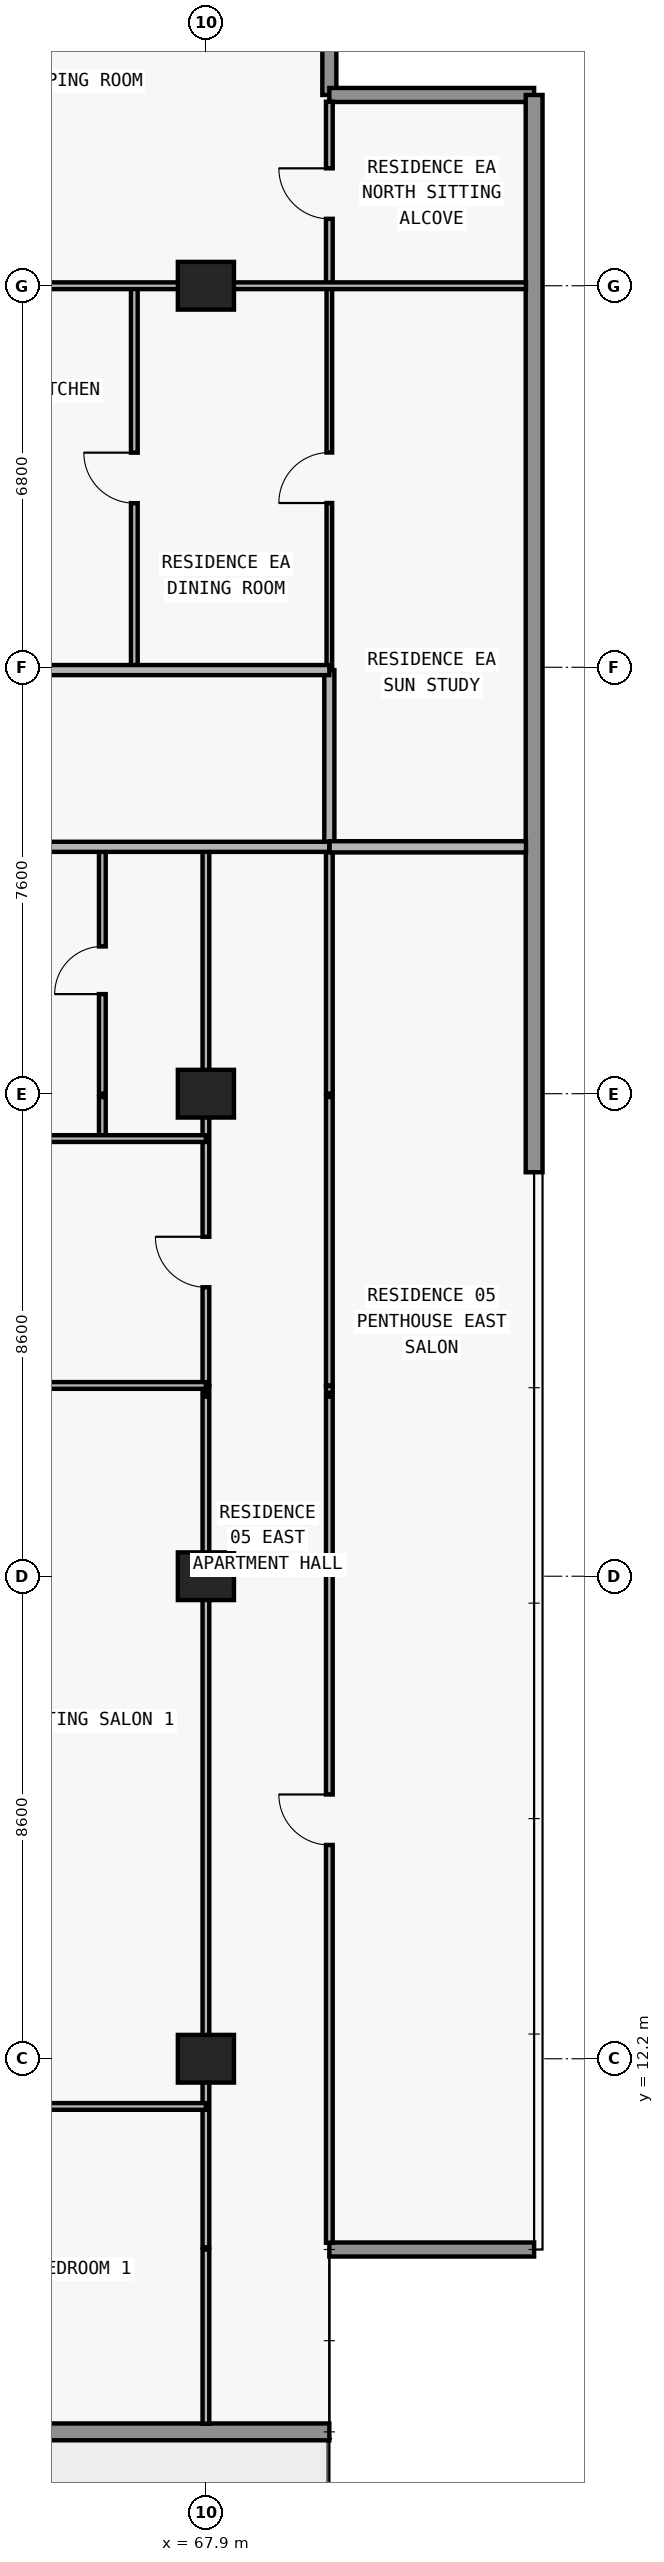
"""IFC4 building model, lengths in metres.
Left out: names, types, materials, properties, quantities, classifications, styles, units other than length and angle.
Written with IfcOpenShell. Run it as: python <this file> out.ifc"""

import sys

from ifc_helpers import new_model, si_unit, direction, frame, frame_2d, origin, origin_2d, place, context, subcontext, project, spatial, rectangle, extrude, element, fill, save


model = new_model("IFC4")
c1 = context("Model", 3, precision=1e-05, world=origin(), true_north=direction((0.0, 1.0)))
c2 = subcontext(c1, "Body", "Model", "MODEL_VIEW")
j1 = project(units=[si_unit("LENGTHUNIT", "METRE"), si_unit("PLANEANGLEUNIT", "RADIAN")], contexts=[c1])
p1 = place(None, origin())
s1 = spatial("IfcSite", under=j1, at=p1, CompositionType="ELEMENT")
p2 = place(p1, origin())
s2 = spatial("IfcBuilding", under=s1, at=p2, CompositionType="ELEMENT")
p3 = place(p2, frame((0.0, 0.0, 91.2)))
s3 = spatial("IfcBuildingStorey", under=s2, at=p3, CompositionType="ELEMENT", Elevation=91.2)
for number, where, z_axis, x_axis in (
    (1, (67.9, 12.2, 0.0), (0.0, 0.0, 1.0), (1.0, 0.0, 0.0)),
    (2, (67.9, 20.8, 0.0), (0.0, 0.0, 1.0), (1.0, 0.0, 0.0)),
    (3, (67.9, 29.4, 0.0), (0.0, 0.0, 1.0), (1.0, 0.0, 0.0)),
    (4, (67.9, 43.8, 0.0), (0.0, 0.0, 1.0), (1.0, 0.0, 0.0)),
):
    element("IfcColumn", number, at=place(p3, frame(where, z_axis=z_axis, x_axis=x_axis)), inside=s3, PredefinedType="COLUMN", context=c2, shape_type="SweptSolid", body=[
        extrude(rectangle(XDim=1.0, YDim=0.85, at=origin_2d()), origin(), (0.0, 0.0, 1.0), 3.05),
    ])
p4 = place(p3, frame((70.1, 5.55, 0.0), z_axis=(0.0, 0.0, 1.0), x_axis=(-1.0, 0.0, 0.0)))
e5 = element("IfcWall", 5, at=p4, inside=s3, PredefinedType="STANDARD", context=c2, shape_type="SweptSolid", body=[
    extrude(rectangle(XDim=62.4, YDim=0.3, at=frame_2d((31.2, 0.0))), origin(), (0.0, 0.0, 1.0), 3.05),
])
p5 = place(p4, frame((57.29, 0.0, 0.0)))
e6 = element("IfcOpeningElement", 6, at=p5, cuts=e5, PredefinedType="OPENING", context=c2, shape_type="SweptSolid", body=[
    extrude(rectangle(XDim=2.0, YDim=2.3, at=frame_2d((1.0, 1.15))), frame((0.0, 0.16, 0.0), z_axis=(0.0, -1.0, 0.0), x_axis=(1.0, 0.0, 0.0)), (0.0, 0.0, 1.0), 0.32),
])
p6 = place(p4, frame((52.61, 0.0, 0.65)))
e7 = element("IfcOpeningElement", 7, at=p6, cuts=e5, PredefinedType="OPENING", context=c2, shape_type="SweptSolid", body=[
    extrude(rectangle(XDim=2.6, YDim=1.85, at=frame_2d((1.3, 0.925))), frame((0.0, 0.16, 0.0), z_axis=(0.0, -1.0, 0.0), x_axis=(1.0, 0.0, 0.0)), (0.0, 0.0, 1.0), 0.32),
])
p7 = place(p4, frame((46.5, 0.0, 0.85)))
e8 = element("IfcOpeningElement", 8, at=p7, cuts=e5, PredefinedType="OPENING", context=c2, shape_type="SweptSolid", body=[
    extrude(rectangle(XDim=2.2, YDim=1.55, at=frame_2d((1.1, 0.775))), frame((0.0, 0.16, 0.0), z_axis=(0.0, -1.0, 0.0), x_axis=(1.0, 0.0, 0.0)), (0.0, 0.0, 1.0), 0.32),
])
p8 = place(p4, frame((40.09, 0.0, 0.0)))
e9 = element("IfcOpeningElement", 9, at=p8, cuts=e5, PredefinedType="OPENING", context=c2, shape_type="SweptSolid", body=[
    extrude(rectangle(XDim=2.0, YDim=2.3, at=frame_2d((1.0, 1.15))), frame((0.0, 0.16, 0.0), z_axis=(0.0, -1.0, 0.0), x_axis=(1.0, 0.0, 0.0)), (0.0, 0.0, 1.0), 0.32),
])
p9 = place(p4, frame((35.99, 0.0, 0.85)))
e10 = element("IfcOpeningElement", 10, at=p9, cuts=e5, PredefinedType="OPENING", context=c2, shape_type="SweptSolid", body=[
    extrude(rectangle(XDim=1.8, YDim=1.55, at=frame_2d((0.9, 0.775))), frame((0.0, 0.16, 0.0), z_axis=(0.0, -1.0, 0.0), x_axis=(1.0, 0.0, 0.0)), (0.0, 0.0, 1.0), 0.32),
])
p10 = place(p4, frame((28.314, 0.0, 0.85)))
e11 = element("IfcOpeningElement", 11, at=p10, cuts=e5, PredefinedType="OPENING", context=c2, shape_type="SweptSolid", body=[
    extrude(rectangle(XDim=2.2, YDim=1.55, at=frame_2d((1.1, 0.775))), frame((0.0, 0.16, 0.0), z_axis=(0.0, -1.0, 0.0), x_axis=(1.0, 0.0, 0.0)), (0.0, 0.0, 1.0), 0.32),
])
p11 = place(p4, frame((24.09, 0.0, 0.0)))
e12 = element("IfcOpeningElement", 12, at=p11, cuts=e5, PredefinedType="OPENING", context=c2, shape_type="SweptSolid", body=[
    extrude(rectangle(XDim=2.0, YDim=2.3, at=frame_2d((1.0, 1.15))), frame((0.0, 0.16, 0.0), z_axis=(0.0, -1.0, 0.0), x_axis=(1.0, 0.0, 0.0)), (0.0, 0.0, 1.0), 0.32),
])
p12 = place(p4, frame((19.99, 0.0, 0.85)))
e13 = element("IfcOpeningElement", 13, at=p12, cuts=e5, PredefinedType="OPENING", context=c2, shape_type="SweptSolid", body=[
    extrude(rectangle(XDim=1.8, YDim=1.55, at=frame_2d((0.9, 0.775))), frame((0.0, 0.16, 0.0), z_axis=(0.0, -1.0, 0.0), x_axis=(1.0, 0.0, 0.0)), (0.0, 0.0, 1.0), 0.32),
])
p13 = place(p4, frame((16.09, 0.0, 0.0)))
e14 = element("IfcOpeningElement", 14, at=p13, cuts=e5, PredefinedType="OPENING", context=c2, shape_type="SweptSolid", body=[
    extrude(rectangle(XDim=2.0, YDim=2.3, at=frame_2d((1.0, 1.15))), frame((0.0, 0.16, 0.0), z_axis=(0.0, -1.0, 0.0), x_axis=(1.0, 0.0, 0.0)), (0.0, 0.0, 1.0), 0.32),
])
p14 = place(p4, frame((11.41, 0.0, 0.65)))
e15 = element("IfcOpeningElement", 15, at=p14, cuts=e5, PredefinedType="OPENING", context=c2, shape_type="SweptSolid", body=[
    extrude(rectangle(XDim=2.6, YDim=1.85, at=frame_2d((1.3, 0.925))), frame((0.0, 0.16, 0.0), z_axis=(0.0, -1.0, 0.0), x_axis=(1.0, 0.0, 0.0)), (0.0, 0.0, 1.0), 0.32),
])
p15 = place(p4, frame((5.3, 0.0, 0.85)))
e16 = element("IfcOpeningElement", 16, at=p15, cuts=e5, PredefinedType="OPENING", context=c2, shape_type="SweptSolid", body=[
    extrude(rectangle(XDim=2.2, YDim=1.55, at=frame_2d((1.1, 0.775))), frame((0.0, 0.16, 0.0), z_axis=(0.0, -1.0, 0.0), x_axis=(1.0, 0.0, 0.0)), (0.0, 0.0, 1.0), 0.32),
])
p16 = place(p3, frame((70.1, 8.8, 0.0), z_axis=(0.0, 0.0, 1.0), x_axis=(1.0, 0.0, 0.0)))
e17 = element("IfcWall", 17, at=p16, inside=s3, PredefinedType="ELEMENTEDWALL", context=c2, shape_type="SweptSolid", body=[
    extrude(rectangle(XDim=3.65, YDim=0.25, at=frame_2d((1.825, 0.0))), origin(), (0.0, 0.0, 1.0), 3.05),
])
p17 = place(p3, frame((70.1, 50.45, 0.0), z_axis=(0.0, 0.0, 1.0), x_axis=(0.0, -1.0, 0.0)))
e18 = element("IfcWall", 18, at=p17, inside=s3, PredefinedType="ELEMENTEDWALL", context=c2, shape_type="SweptSolid", body=[
    extrude(rectangle(XDim=3.25, YDim=0.25, at=frame_2d((1.625, 0.0))), origin(), (0.0, 0.0, 1.0), 3.05),
])
p18 = place(p3, frame((70.1, 47.2, 0.0), z_axis=(0.0, 0.0, 1.0), x_axis=(1.0, 0.0, 0.0)))
e19 = element("IfcWall", 19, at=p18, inside=s3, PredefinedType="ELEMENTEDWALL", context=c2, shape_type="SweptSolid", body=[
    extrude(rectangle(XDim=3.65, YDim=0.25, at=frame_2d((1.825, 0.0))), origin(), (0.0, 0.0, 1.0), 3.05),
])
p19 = place(p3, frame((73.75, 47.2, 0.0), z_axis=(0.0, 0.0, 1.0), x_axis=(0.0, -1.0, 0.0)))
e20 = element("IfcWall", 20, at=p19, inside=s3, PredefinedType="STANDARD", context=c2, shape_type="SweptSolid", body=[
    extrude(rectangle(XDim=19.2, YDim=0.3, at=frame_2d((9.6, 0.0))), origin(), (0.0, 0.0, 1.0), 3.05),
])
p20 = place(p3, frame((66.054, 28.6, 0.0), z_axis=(0.0, 0.0, 1.0), x_axis=(0.0, 1.0, 0.0)))
e21 = element("IfcWall", 21, at=p20, inside=s3, PredefinedType="PARTITIONING", context=c2, shape_type="SweptSolid", body=[
    extrude(rectangle(XDim=0.74, YDim=0.12, at=frame_2d((0.37, 0.0))), origin(), (0.0, 0.0, 1.0), 3.05),
])
p21 = place(p3, frame((66.054, 29.4, 0.0), z_axis=(0.0, 0.0, 1.0), x_axis=(0.0, 1.0, 0.0)))
e22 = element("IfcWall", 22, at=p21, inside=s3, PredefinedType="PARTITIONING", context=c2, shape_type="SweptSolid", body=[
    extrude(rectangle(XDim=4.4, YDim=0.12, at=frame_2d((2.2, 0.0))), origin(), (0.0, 0.0, 1.0), 3.05),
])
p22 = place(p21, frame((1.775, 0.0, 0.0)))
e23 = element("IfcOpeningElement", 23, at=p22, cuts=e22, PredefinedType="OPENING", context=c2, shape_type="SweptSolid", body=[
    extrude(rectangle(XDim=0.85, YDim=2.1, at=frame_2d((0.425, 1.05))), frame((0.0, 0.07, 0.0), z_axis=(0.0, -1.0, 0.0), x_axis=(1.0, 0.0, 0.0)), (0.0, 0.0, 1.0), 0.14),
])
p23 = place(p3, frame((66.624, 36.95, 0.0), z_axis=(0.0, 0.0, 1.0), x_axis=(0.0, 1.0, 0.0)))
e24 = element("IfcWall", 24, at=p23, inside=s3, PredefinedType="PARTITIONING", context=c2, shape_type="SweptSolid", body=[
    extrude(rectangle(XDim=6.85, YDim=0.12, at=frame_2d((3.425, 0.0))), origin(), (0.0, 0.0, 1.0), 3.05),
])
p24 = place(p23, frame((2.975, 0.0, 0.0)))
e25 = element("IfcOpeningElement", 25, at=p24, cuts=e24, PredefinedType="OPENING", context=c2, shape_type="SweptSolid", body=[
    extrude(rectangle(XDim=0.9, YDim=2.15, at=frame_2d((0.45, 1.075))), frame((0.0, 0.07, 0.0), z_axis=(0.0, -1.0, 0.0), x_axis=(1.0, 0.0, 0.0)), (0.0, 0.0, 1.0), 0.14),
])
p25 = place(p3, frame((67.9, 5.695, 0.0), z_axis=(0.0, 0.0, 1.0), x_axis=(0.0, 1.0, 0.0)))
e26 = element("IfcWall", 26, at=p25, inside=s3, PredefinedType="PARTITIONING", context=c2, shape_type="SweptSolid", body=[
    extrude(rectangle(XDim=3.105, YDim=0.12, at=frame_2d((1.552, 0.0))), origin(), (0.0, 0.0, 1.0), 3.05),
])
p26 = place(p3, frame((67.9, 8.84, 0.0), z_axis=(0.0, 0.0, 1.0), x_axis=(0.0, 1.0, 0.0)))
e27 = element("IfcWall", 27, at=p26, inside=s3, PredefinedType="PARTITIONING", context=c2, shape_type="SweptSolid", body=[
    extrude(rectangle(XDim=15.16, YDim=0.12, at=frame_2d((7.58, 0.0))), origin(), (0.0, 0.0, 1.0), 2.174),
])
p27 = place(p3, frame((67.9, 24.07, 0.0), z_axis=(0.0, 0.0, 1.0), x_axis=(0.0, 1.0, 0.0)))
e28 = element("IfcWall", 28, at=p27, inside=s3, PredefinedType="PARTITIONING", context=c2, shape_type="SweptSolid", body=[
    extrude(rectangle(XDim=0.12, YDim=0.12, at=frame_2d((0.06, 0.0))), origin(), (0.0, 0.0, 1.0), 2.174),
])
p28 = place(p3, frame((67.9, 24.2, 0.0), z_axis=(0.0, 0.0, 1.0), x_axis=(0.0, 1.0, 0.0)))
e29 = element("IfcWall", 29, at=p28, inside=s3, PredefinedType="PARTITIONING", context=c2, shape_type="SweptSolid", body=[
    extrude(rectangle(XDim=5.14, YDim=0.12, at=frame_2d((2.57, 0.0))), origin(), (0.0, 0.0, 1.0), 2.174),
])
p29 = place(p28, frame((1.75, 0.0, 0.0)))
e30 = element("IfcOpeningElement", 30, at=p29, cuts=e29, PredefinedType="OPENING", context=c2, shape_type="SweptSolid", body=[
    extrude(rectangle(XDim=0.9, YDim=2.124, at=frame_2d((0.45, 1.062))), frame((0.0, 0.07, 0.0), z_axis=(0.0, -1.0, 0.0), x_axis=(1.0, 0.0, 0.0)), (0.0, 0.0, 1.0), 0.14),
])
p30 = place(p3, frame((67.9, 29.4, 0.0), z_axis=(0.0, 0.0, 1.0), x_axis=(0.0, 1.0, 0.0)))
e31 = element("IfcWall", 31, at=p30, inside=s3, PredefinedType="PARTITIONING", context=c2, shape_type="SweptSolid", body=[
    extrude(rectangle(XDim=4.4, YDim=0.12, at=frame_2d((2.2, 0.0))), origin(), (0.0, 0.0, 1.0), 2.174),
])
p31 = place(p3, frame((70.1, 8.92, 0.0), z_axis=(0.0, 0.0, 1.0), x_axis=(0.0, 1.0, 0.0)))
e32 = element("IfcWall", 32, at=p31, inside=s3, PredefinedType="PARTITIONING", context=c2, shape_type="SweptSolid", body=[
    extrude(rectangle(XDim=15.08, YDim=0.12, at=frame_2d((7.54, 0.0))), origin(), (0.0, 0.0, 1.0), 3.05),
])
p32 = place(p31, frame((7.09, 0.0, 0.0)))
e33 = element("IfcOpeningElement", 33, at=p32, cuts=e32, PredefinedType="OPENING", context=c2, shape_type="SweptSolid", body=[
    extrude(rectangle(XDim=0.9, YDim=2.15, at=frame_2d((0.45, 1.075))), frame((0.0, 0.07, 0.0), z_axis=(0.0, -1.0, 0.0), x_axis=(1.0, 0.0, 0.0)), (0.0, 0.0, 1.0), 0.14),
])
p33 = place(p3, frame((70.1, 24.07, 0.0), z_axis=(0.0, 0.0, 1.0), x_axis=(0.0, 1.0, 0.0)))
e34 = element("IfcWall", 34, at=p33, inside=s3, PredefinedType="PARTITIONING", context=c2, shape_type="SweptSolid", body=[
    extrude(rectangle(XDim=0.12, YDim=0.12, at=frame_2d((0.06, 0.0))), origin(), (0.0, 0.0, 1.0), 3.05),
])
p34 = place(p3, frame((70.1, 24.2, 0.0), z_axis=(0.0, 0.0, 1.0), x_axis=(0.0, 1.0, 0.0)))
e35 = element("IfcWall", 35, at=p34, inside=s3, PredefinedType="PARTITIONING", context=c2, shape_type="SweptSolid", body=[
    extrude(rectangle(XDim=5.14, YDim=0.12, at=frame_2d((2.57, 0.0))), origin(), (0.0, 0.0, 1.0), 3.05),
])
p35 = place(p3, frame((70.1, 29.4, 0.0), z_axis=(0.0, 0.0, 1.0), x_axis=(0.0, 1.0, 0.0)))
e36 = element("IfcWall", 36, at=p35, inside=s3, PredefinedType="PARTITIONING", context=c2, shape_type="SweptSolid", body=[
    extrude(rectangle(XDim=4.4, YDim=0.12, at=frame_2d((2.2, 0.0))), origin(), (0.0, 0.0, 1.0), 3.05),
])
p36 = place(p3, frame((70.1, 33.805, 0.0), z_axis=(0.0, 0.0, 1.0), x_axis=(0.0, 1.0, 0.0)))
e37 = element("IfcWall", 37, at=p36, inside=s3, PredefinedType="PARTITIONING", context=c2, shape_type="SweptSolid", body=[
    extrude(rectangle(XDim=3.145, YDim=0.18, at=frame_2d((1.573, 0.0))), origin(), (0.0, 0.0, 1.0), 3.05),
])
p37 = place(p3, frame((70.1, 36.955, 0.0), z_axis=(0.0, 0.0, 1.0), x_axis=(0.0, 1.0, 0.0)))
e38 = element("IfcWall", 38, at=p37, inside=s3, PredefinedType="MOVABLE", context=c2, shape_type="SweptSolid", body=[
    extrude(rectangle(XDim=6.845, YDim=0.1, at=frame_2d((3.422, 0.0))), origin(), (0.0, 0.0, 1.0), 3.05),
])
p38 = place(p37, frame((2.972, 0.0, 0.0)))
e39 = element("IfcOpeningElement", 39, at=p38, cuts=e38, PredefinedType="OPENING", context=c2, shape_type="SweptSolid", body=[
    extrude(rectangle(XDim=0.9, YDim=2.15, at=frame_2d((0.45, 1.075))), frame((0.0, 0.06, 0.0), z_axis=(0.0, -1.0, 0.0), x_axis=(1.0, 0.0, 0.0)), (0.0, 0.0, 1.0), 0.12),
])
p39 = place(p3, frame((70.1, 43.805, 0.0), z_axis=(0.0, 0.0, 1.0), x_axis=(0.0, 1.0, 0.0)))
e40 = element("IfcWall", 40, at=p39, inside=s3, PredefinedType="PARTITIONING", context=c2, shape_type="SweptSolid", body=[
    extrude(rectangle(XDim=3.275, YDim=0.12, at=frame_2d((1.638, 0.0))), origin(), (0.0, 0.0, 1.0), 3.05),
])
p40 = place(p39, frame((1.188, 0.0, 0.0)))
e41 = element("IfcOpeningElement", 41, at=p40, cuts=e40, PredefinedType="OPENING", context=c2, shape_type="SweptSolid", body=[
    extrude(rectangle(XDim=0.9, YDim=2.15, at=frame_2d((0.45, 1.075))), frame((0.0, 0.07, 0.0), z_axis=(0.0, -1.0, 0.0), x_axis=(1.0, 0.0, 0.0)), (0.0, 0.0, 1.0), 0.14),
])
p41 = place(p3, frame((59.55, 11.35, 0.0), z_axis=(0.0, 0.0, 1.0), x_axis=(1.0, 0.0, 0.0)))
e42 = element("IfcWall", 42, at=p41, inside=s3, PredefinedType="PARTITIONING", context=c2, shape_type="SweptSolid", body=[
    extrude(rectangle(XDim=8.35, YDim=0.12, at=frame_2d((4.175, 0.0))), origin(), (0.0, 0.0, 1.0), 3.05),
])
p42 = place(p41, frame((3.725, 0.0, 0.0)))
e43 = element("IfcOpeningElement", 43, at=p42, cuts=e42, PredefinedType="OPENING", context=c2, shape_type="SweptSolid", body=[
    extrude(rectangle(XDim=0.9, YDim=2.15, at=frame_2d((0.45, 1.075))), frame((0.0, 0.07, 0.0), z_axis=(0.0, -1.0, 0.0), x_axis=(1.0, 0.0, 0.0)), (0.0, 0.0, 1.0), 0.14),
])
p43 = place(p3, frame((59.55, 24.2, 0.0), z_axis=(0.0, 0.0, 1.0), x_axis=(1.0, 0.0, 0.0)))
e44 = element("IfcWall", 44, at=p43, inside=s3, PredefinedType="PARTITIONING", context=c2, shape_type="SweptSolid", body=[
    extrude(rectangle(XDim=8.35, YDim=0.12, at=frame_2d((4.175, 0.0))), origin(), (0.0, 0.0, 1.0), 3.05),
])
p44 = place(p43, frame((3.725, 0.0, 0.0)))
e45 = element("IfcOpeningElement", 45, at=p44, cuts=e44, PredefinedType="OPENING", context=c2, shape_type="SweptSolid", body=[
    extrude(rectangle(XDim=0.9, YDim=2.15, at=frame_2d((0.45, 1.075))), frame((0.0, 0.07, 0.0), z_axis=(0.0, -1.0, 0.0), x_axis=(1.0, 0.0, 0.0)), (0.0, 0.0, 1.0), 0.14),
])
p45 = place(p3, frame((59.55, 28.6, 0.0), z_axis=(0.0, 0.0, 1.0), x_axis=(1.0, 0.0, 0.0)))
e46 = element("IfcWall", 46, at=p45, inside=s3, PredefinedType="PARTITIONING", context=c2, shape_type="SweptSolid", body=[
    extrude(rectangle(XDim=8.35, YDim=0.12, at=frame_2d((4.175, 0.0))), origin(), (0.0, 0.0, 1.0), 3.05),
])
p46 = place(p45, frame((2.802, 0.0, 0.0)))
e47 = element("IfcOpeningElement", 47, at=p46, cuts=e46, PredefinedType="OPENING", context=c2, shape_type="SweptSolid", body=[
    extrude(rectangle(XDim=0.9, YDim=2.15, at=frame_2d((0.45, 1.075))), frame((0.0, 0.07, 0.0), z_axis=(0.0, -1.0, 0.0), x_axis=(1.0, 0.0, 0.0)), (0.0, 0.0, 1.0), 0.14),
])
p47 = place(p3, frame((59.55, 33.8, 0.0), z_axis=(0.0, 0.0, 1.0), x_axis=(1.0, 0.0, 0.0)))
e48 = element("IfcWall", 48, at=p47, inside=s3, PredefinedType="PARTITIONING", context=c2, shape_type="SweptSolid", body=[
    extrude(rectangle(XDim=10.55, YDim=0.18, at=frame_2d((5.275, 0.0))), origin(), (0.0, 0.0, 1.0), 3.05),
])
p48 = place(p3, frame((70.105, 33.8, 0.0), z_axis=(0.0, 0.0, 1.0), x_axis=(1.0, 0.0, 0.0)))
e49 = element("IfcWall", 49, at=p48, inside=s3, PredefinedType="PARTITIONING", context=c2, shape_type="SweptSolid", body=[
    extrude(rectangle(XDim=3.5, YDim=0.2, at=frame_2d((1.75, 0.0))), origin(), (0.0, 0.0, 1.0), 3.05),
])
p49 = place(p3, frame((59.955, 36.95, 0.0), z_axis=(0.0, 0.0, 1.0), x_axis=(1.0, 0.0, 0.0)))
e50 = element("IfcWall", 50, at=p49, inside=s3, PredefinedType="PARTITIONING", context=c2, shape_type="SweptSolid", body=[
    extrude(rectangle(XDim=10.145, YDim=0.18, at=frame_2d((5.073, 0.0))), origin(), (0.0, 0.0, 1.0), 3.05),
])
p50 = place(p49, frame((3.957, 0.0, 0.0)))
e51 = element("IfcOpeningElement", 51, at=p50, cuts=e50, PredefinedType="OPENING", context=c2, shape_type="SweptSolid", body=[
    extrude(rectangle(XDim=1.0, YDim=2.2, at=frame_2d((0.5, 1.1))), frame((0.0, 0.1, 0.0), z_axis=(0.0, -1.0, 0.0), x_axis=(1.0, 0.0, 0.0)), (0.0, 0.0, 1.0), 0.2),
])
p51 = place(p3, frame((59.945, 43.8, 0.0), z_axis=(0.0, 0.0, 1.0), x_axis=(1.0, 0.0, 0.0)))
e52 = element("IfcWall", 52, at=p51, inside=s3, PredefinedType="PARTITIONING", context=c2, shape_type="SweptSolid", body=[
    extrude(rectangle(XDim=13.66, YDim=0.12, at=frame_2d((6.83, 0.0))), origin(), (0.0, 0.0, 1.0), 2.339),
])
p52 = place(p51, frame((4.017, 0.0, 0.0)))
e53 = element("IfcOpeningElement", 53, at=p52, cuts=e52, PredefinedType="OPENING", context=c2, shape_type="SweptSolid", body=[
    extrude(rectangle(XDim=0.9, YDim=2.15, at=frame_2d((0.45, 1.075))), frame((0.0, 0.07, 0.0), z_axis=(0.0, -1.0, 0.0), x_axis=(1.0, 0.0, 0.0)), (0.0, 0.0, 1.0), 0.14),
])
p53 = place(p51, frame((0.702, 0.0, 0.0)))
e54 = element("IfcOpeningElement", 54, at=p53, cuts=e52, PredefinedType="OPENING", context=c2, shape_type="SweptSolid", body=[
    extrude(rectangle(XDim=0.85, YDim=2.1, at=frame_2d((0.425, 1.05))), frame((0.0, 0.07, 0.0), z_axis=(0.0, -1.0, 0.0), x_axis=(1.0, 0.0, 0.0)), (0.0, 0.0, 1.0), 0.14),
])
p54 = place(p22, origin())
e55 = element("IfcDoor", 55, at=p54, inside=s3, OperationType="SINGLE_SWING_LEFT", PredefinedType="DOOR", context=c2, shape_type="SweptSolid", body=[
    extrude(rectangle(XDim=0.85, YDim=2.1, at=frame_2d((0.425, 1.05))), frame((0.0, 0.025, 0.0), z_axis=(0.0, -1.0, 0.0), x_axis=(1.0, 0.0, 0.0)), (0.0, 0.0, 1.0), 0.05),
])
fill(e23, e55)
p55 = place(p29, origin())
e56 = element("IfcDoor", 56, at=p55, inside=s3, OperationType="SINGLE_SWING_RIGHT", PredefinedType="DOOR", context=c2, shape_type="SweptSolid", body=[
    extrude(rectangle(XDim=0.9, YDim=2.124, at=frame_2d((0.45, 1.062))), frame((0.0, 0.025, 0.0), z_axis=(0.0, -1.0, 0.0), x_axis=(1.0, 0.0, 0.0)), (0.0, 0.0, 1.0), 0.05),
])
fill(e30, e56)
p56 = place(p32, origin())
e57 = element("IfcDoor", 57, at=p56, inside=s3, OperationType="SINGLE_SWING_RIGHT", PredefinedType="DOOR", context=c2, shape_type="SweptSolid", body=[
    extrude(rectangle(XDim=0.9, YDim=2.15, at=frame_2d((0.45, 1.075))), frame((0.0, 0.025, 0.0), z_axis=(0.0, -1.0, 0.0), x_axis=(1.0, 0.0, 0.0)), (0.0, 0.0, 1.0), 0.05),
])
fill(e33, e57)
p57 = place(p24, origin())
e58 = element("IfcDoor", 58, at=p57, inside=s3, OperationType="SINGLE_SWING_RIGHT", PredefinedType="DOOR", context=c2, shape_type="SweptSolid", body=[
    extrude(rectangle(XDim=0.9, YDim=2.15, at=frame_2d((0.45, 1.075))), frame((0.0, 0.025, 0.0), z_axis=(0.0, -1.0, 0.0), x_axis=(1.0, 0.0, 0.0)), (0.0, 0.0, 1.0), 0.05),
])
fill(e25, e58)
p58 = place(p38, origin())
e59 = element("IfcDoor", 59, at=p58, inside=s3, OperationType="SINGLE_SWING_LEFT", PredefinedType="DOOR", context=c2, shape_type="SweptSolid", body=[
    extrude(rectangle(XDim=0.9, YDim=2.15, at=frame_2d((0.45, 1.075))), frame((0.0, 0.025, 0.0), z_axis=(0.0, -1.0, 0.0), x_axis=(1.0, 0.0, 0.0)), (0.0, 0.0, 1.0), 0.05),
])
fill(e39, e59)
p59 = place(p40, origin())
e60 = element("IfcDoor", 60, at=p59, inside=s3, OperationType="SINGLE_SWING_RIGHT", PredefinedType="DOOR", context=c2, shape_type="SweptSolid", body=[
    extrude(rectangle(XDim=0.9, YDim=2.15, at=frame_2d((0.45, 1.075))), frame((0.0, 0.025, 0.0), z_axis=(0.0, -1.0, 0.0), x_axis=(1.0, 0.0, 0.0)), (0.0, 0.0, 1.0), 0.05),
])
fill(e41, e60)
save(model, sys.argv[1])
